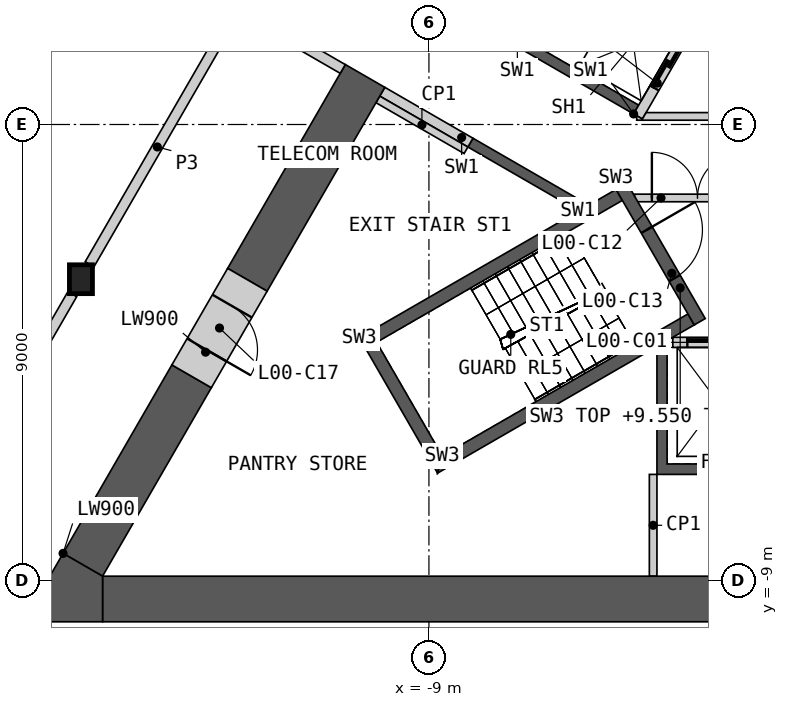
"""IFC4 building model, lengths in metres.
Left out: names, types, materials, properties, quantities, classifications, styles, units other than length and angle.
Written with IfcOpenShell. Run it as: python <this file> out.ifc"""

import sys

from ifc_helpers import new_model, si_unit, direction, frame, frame_2d, origin, origin_2d, place, context, subcontext, project, spatial, polyline, rectangle, i_section, outline, extrude, element, fill, save


model = new_model("IFC4")
c1 = context("Model", 3, precision=1e-05, world=origin(), true_north=direction((0.0, 1.0)))
c2 = subcontext(c1, "Body", "Model", "MODEL_VIEW")
j1 = project(units=[si_unit("LENGTHUNIT", "METRE"), si_unit("PLANEANGLEUNIT", "RADIAN")], contexts=[c1])
p1 = place(None, origin())
s1 = spatial("IfcSite", under=j1, at=p1, CompositionType="ELEMENT")
p2 = place(p1, origin())
s2 = spatial("IfcBuilding", under=s1, at=p2, CompositionType="ELEMENT")
p3 = place(p2, origin())
s3 = spatial("IfcBuildingStorey", under=s2, at=p3, CompositionType="ELEMENT", Elevation=0.0)
p4 = place(p3, frame((-15.868, -3.054, 0.0), z_axis=(0.0, 0.0, 1.0), x_axis=(1.0, 0.0, 0.0)))
e1 = element("IfcColumn", 1, at=p4, inside=s3, PredefinedType="COLUMN", context=c2, shape_type="SweptSolid", body=[
    extrude(i_section(OverallWidth=0.454, OverallDepth=0.57, WebThickness=0.078, FlangeThickness=0.125, at=origin_2d()), origin(), (0.0, 0.0, 1.0), 10.0),
])
p5 = place(p3, origin())
e2 = element("IfcWall", 2, at=p5, inside=s3, PredefinedType="SHEAR", context=c2, shape_type="SweptSolid", body=[
    extrude(outline(polyline([(4.5, -4.4), (4.5, -6.906), (-4.5, -6.906), (-4.5, -4.4), (-4.3, -4.4), (-4.3, -6.7), (-2.3, -6.7), (-2.3, -4.4), (-2.1, -4.4), (-2.1, -6.7), (-0.1, -6.7), (-0.1, -4.4), (0.1, -4.4), (0.1, -6.7), (2.1, -6.7), (2.1, -4.4), (2.3, -4.4), (2.3, -6.7), (4.3, -6.7), (4.3, -4.4), (4.5, -4.4)])), origin(), (0.0, 0.0, 1.0), 9.55),
])
p6 = place(p3, frame((-4.187, -4.3, 0.0), z_axis=(0.0, 0.0, 1.0), x_axis=(1.0, 0.0, 0.0)))
e3 = element("IfcWall", 3, at=p6, inside=s3, PredefinedType="SOLIDWALL", context=c2, shape_type="SweptSolid", body=[
    extrude(rectangle(XDim=8.373, YDim=0.2, at=frame_2d((4.187, 0.0))), origin(), (0.0, 0.0, 1.0), 9.55),
])
p7 = place(p6, frame((0.287, 0.0, 0.0)))
e4 = element("IfcOpeningElement", 4, at=p7, cuts=e3, PredefinedType="OPENING", context=c2, shape_type="SweptSolid", body=[
    extrude(rectangle(XDim=1.2, YDim=2.1, at=frame_2d((0.6, 1.05))), frame((0.0, 0.11, 0.0), z_axis=(0.0, -1.0, 0.0), x_axis=(1.0, 0.0, 0.0)), (0.0, 0.0, 1.0), 0.22),
])
p8 = place(p6, frame((2.387, 0.0, 0.0)))
e5 = element("IfcOpeningElement", 5, at=p8, cuts=e3, PredefinedType="OPENING", context=c2, shape_type="SweptSolid", body=[
    extrude(rectangle(XDim=1.4, YDim=2.1, at=frame_2d((0.7, 1.05))), frame((0.0, 0.11, 0.0), z_axis=(0.0, -1.0, 0.0), x_axis=(1.0, 0.0, 0.0)), (0.0, 0.0, 1.0), 0.22),
])
p9 = place(p6, frame((4.737, 0.0, 0.0)))
e6 = element("IfcOpeningElement", 6, at=p9, cuts=e3, PredefinedType="OPENING", context=c2, shape_type="SweptSolid", body=[
    extrude(rectangle(XDim=1.1, YDim=2.1, at=frame_2d((0.55, 1.05))), frame((0.0, 0.11, 0.0), z_axis=(0.0, -1.0, 0.0), x_axis=(1.0, 0.0, 0.0)), (0.0, 0.0, 1.0), 0.22),
])
p10 = place(p6, frame((6.887, 0.0, 0.0)))
e7 = element("IfcOpeningElement", 7, at=p10, cuts=e3, PredefinedType="OPENING", context=c2, shape_type="SweptSolid", body=[
    extrude(rectangle(XDim=1.2, YDim=2.1, at=frame_2d((0.6, 1.05))), frame((0.0, 0.11, 0.0), z_axis=(0.0, -1.0, 0.0), x_axis=(1.0, 0.0, 0.0)), (0.0, 0.0, 1.0), 0.22),
])
p11 = place(p3, origin())
e8 = element("IfcWall", 8, at=p11, inside=s3, PredefinedType="SHEAR", context=c2, shape_type="SweptSolid", body=[
    extrude(outline(polyline([(-6.061, -1.697), (-8.231, -0.444), (-8.131, -0.271), (-5.96, -1.524), (-6.061, -1.697)])), origin(), (0.0, 0.0, 1.0), 9.55),
])
p12 = place(p3, origin())
e9 = element("IfcWall", 9, at=p12, inside=s3, PredefinedType="SHEAR", context=c2, shape_type="SweptSolid", body=[
    extrude(outline(polyline([(-4.96, 0.208), (-7.131, 1.461), (-5.931, 3.54), (-3.76, 2.287), (-3.861, 2.113), (-5.852, 3.263), (-6.852, 1.531), (-4.861, 0.381), (-4.96, 0.208)])), origin(), (0.0, 0.0, 1.0), 9.55),
])
p13 = place(p3, frame((-1.631, 5.776, 0.0), z_axis=(0.0, 0.0, 1.0), x_axis=(-0.499992876559, -0.866029516466, 0.0)))
e10 = element("IfcWall", 10, at=p13, inside=s3, PredefinedType="SOLIDWALL", context=c2, shape_type="SweptSolid", body=[
    extrude(rectangle(XDim=6.486, YDim=0.2, at=frame_2d((3.243, 0.0))), origin(), (0.0, 0.0, 1.0), 9.55),
])
p14 = place(p13, frame((0.437, 0.0, 0.0)))
e11 = element("IfcOpeningElement", 11, at=p14, cuts=e10, PredefinedType="OPENING", context=c2, shape_type="SweptSolid", body=[
    extrude(rectangle(XDim=0.9, YDim=2.1, at=frame_2d((0.45, 1.05))), frame((0.0, 0.11, 0.0), z_axis=(0.0, -1.0, 0.0), x_axis=(1.0, 0.0, 0.0)), (0.0, 0.0, 1.0), 0.22),
])
p15 = place(p13, frame((2.637, 0.0, 0.0)))
e12 = element("IfcOpeningElement", 12, at=p15, cuts=e10, PredefinedType="OPENING", context=c2, shape_type="SweptSolid", body=[
    extrude(rectangle(XDim=0.9, YDim=2.1, at=frame_2d((0.45, 1.05))), frame((0.0, 0.11, 0.0), z_axis=(0.0, -1.0, 0.0), x_axis=(1.0, 0.0, 0.0)), (0.0, 0.0, 1.0), 0.22),
])
p16 = place(p13, frame((4.737, 0.0, 0.0)))
e13 = element("IfcOpeningElement", 13, at=p16, cuts=e10, PredefinedType="OPENING", context=c2, shape_type="SweptSolid", body=[
    extrude(rectangle(XDim=1.1, YDim=2.1, at=frame_2d((0.55, 1.05))), frame((0.0, 0.11, 0.0), z_axis=(0.0, -1.0, 0.0), x_axis=(1.0, 0.0, 0.0)), (0.0, 0.0, 1.0), 0.22),
])
p17 = place(p3, frame((-8.181, -0.357, 0.0), z_axis=(0.0, 0.0, 1.0), x_axis=(-0.866035824272, 0.499981950752, 0.0)))
e14 = element("IfcWall", 14, at=p17, inside=s3, PredefinedType="SHEAR", context=c2, shape_type="SweptSolid", body=[
    extrude(rectangle(XDim=2.009, YDim=0.2, at=frame_2d((1.004, 0.0))), origin(), (0.0, 0.0, 1.0), 9.55),
])
p18 = place(p3, frame((-4.941, -1.45, 0.0), z_axis=(0.0, 0.0, 1.0), x_axis=(1.0, 0.0, 0.0)))
e15 = element("IfcWall", 15, at=p18, inside=s3, PredefinedType="PARTITIONING", context=c2, shape_type="SweptSolid", body=[
    extrude(rectangle(XDim=9.882, YDim=0.15, at=frame_2d((4.941, 0.0))), origin(), (0.0, 0.0, 1.0), 9.55),
])
p19 = place(p18, frame((4.391, 0.0, 0.0)))
e16 = element("IfcOpeningElement", 16, at=p19, cuts=e15, PredefinedType="OPENING", context=c2, shape_type="SweptSolid", body=[
    extrude(rectangle(XDim=1.1, YDim=2.1, at=frame_2d((0.55, 1.05))), frame((0.0, 0.085, 0.0), z_axis=(0.0, -1.0, 0.0), x_axis=(1.0, 0.0, 0.0)), (0.0, 0.0, 1.0), 0.17),
])
p20 = place(p18, frame((0.341, 0.0, 0.0)))
e17 = element("IfcOpeningElement", 17, at=p20, cuts=e15, PredefinedType="OPENING", context=c2, shape_type="SweptSolid", body=[
    extrude(rectangle(XDim=1.8, YDim=2.1, at=frame_2d((0.9, 1.05))), frame((0.0, 0.085, 0.0), z_axis=(0.0, -1.0, 0.0), x_axis=(1.0, 0.0, 0.0)), (0.0, 0.0, 1.0), 0.17),
])
p21 = place(p3, origin())
e18 = element("IfcWall", 18, at=p21, inside=s3, PredefinedType="PARTITIONING", context=c2, shape_type="SweptSolid", body=[
    extrude(outline(polyline([(-2.575, 0.235), (-2.575, 0.085), (-4.9, 0.085), (-4.9, 0.173), (-4.787, 0.108), (-4.714, 0.235), (-2.575, 0.235)])), origin(), (0.0, 0.0, 1.0), 9.55),
])
p22 = place(p3, origin())
e19 = element("IfcWall", 19, at=p22, inside=s3, PredefinedType="SHEAR", context=c2, shape_type="SweptSolid", body=[
    extrude(outline(polyline([(-5.307, -1.281), (-10.374, -4.206), (-10.032, -4.298), (-5.182, -1.498), (-5.307, -1.281)])), origin(), (0.0, 0.0, 1.0), 9.55),
])
p23 = place(p3, origin())
e20 = element("IfcWall", 20, at=p23, inside=s3, PredefinedType="SHEAR", context=c2, shape_type="SweptSolid", body=[
    extrude(outline(polyline([(-10.374, -4.206), (-8.83, -6.881), (-8.738, -6.539), (-10.032, -4.298), (-10.374, -4.206)])), origin(), (0.0, 0.0, 1.0), 9.55),
])
p24 = place(p3, origin())
e21 = element("IfcWall", 21, at=p24, inside=s3, PredefinedType="SHEAR", context=c2, shape_type="SweptSolid", body=[
    extrude(outline(polyline([(-8.738, -6.539), (-8.83, -6.881), (-3.763, -3.956), (-3.888, -3.739), (-8.738, -6.539)])), origin(), (0.0, 0.0, 1.0), 9.55),
])
p25 = place(p3, frame((-5.199, -1.219, 0.0), z_axis=(0.0, 0.0, 1.0), x_axis=(0.499982516597, -0.866035497597, 0.0)))
e22 = element("IfcWall", 22, at=p25, inside=s3, PredefinedType="SHEAR", context=c2, shape_type="SweptSolid", body=[
    extrude(rectangle(XDim=3.088, YDim=0.25, at=frame_2d((1.544, 0.0))), origin(), (0.0, 0.0, 1.0), 9.55),
])
p26 = place(p25, frame((0.994, 0.0, 0.0)))
e23 = element("IfcOpeningElement", 23, at=p26, cuts=e22, PredefinedType="OPENING", context=c2, shape_type="SweptSolid", body=[
    extrude(rectangle(XDim=1.1, YDim=2.1, at=frame_2d((0.55, 1.05))), frame((0.0, 0.135, 0.0), z_axis=(0.0, -1.0, 0.0), x_axis=(1.0, 0.0, 0.0)), (0.0, 0.0, 1.0), 0.27),
])
p27 = place(p3, frame((-4.575, -6.906, 0.0), z_axis=(0.0, 0.0, 1.0), x_axis=(0.0, -1.0, 0.0)))
e24 = element("IfcWall", 24, at=p27, inside=s3, PredefinedType="PARTITIONING", context=c2, shape_type="SweptSolid", body=[
    extrude(rectangle(XDim=2.009, YDim=0.15, at=frame_2d((1.004, 0.0))), origin(), (0.0, 0.0, 1.0), 9.55),
])
p28 = place(p3, frame((-8.268, -0.509, 0.0), z_axis=(0.0, 0.0, 1.0), x_axis=(-0.866035824272, 0.499981950752, 0.0)))
e25 = element("IfcWall", 25, at=p28, inside=s3, PredefinedType="PARTITIONING", context=c2, shape_type="SweptSolid", body=[
    extrude(rectangle(XDim=2.009, YDim=0.15, at=frame_2d((1.004, 0.0))), origin(), (0.0, 0.0, 1.0), 9.55),
])
p29 = place(p3, frame((-15.441, -9.365, 0.0), z_axis=(0.0, 0.0, 1.0), x_axis=(1.0, 0.0, 0.0)))
e26 = element("IfcWall", 26, at=p29, inside=s3, PredefinedType="SHEAR", context=c2, shape_type="SweptSolid", body=[
    extrude(rectangle(XDim=14.341, YDim=0.9, at=frame_2d((7.17, 0.0))), origin(), (0.0, 0.0, 1.0), 9.55),
])
p30 = place(p3, frame((-10.26, 0.958, 0.0), z_axis=(0.0, 0.0, 1.0), x_axis=(-0.499993887256, -0.86602893295, 0.0)))
e27 = element("IfcWall", 27, at=p30, inside=s3, PredefinedType="SHEAR", context=c2, shape_type="SweptSolid", body=[
    extrude(rectangle(XDim=4.646, YDim=0.9, at=frame_2d((2.323, 0.0))), origin(), (0.0, 0.0, 1.0), 9.55),
])
p31 = place(p3, frame((-13.683, -4.97, 0.0), z_axis=(0.0, 0.0, 1.0), x_axis=(-0.499996331799, -0.866027521611, 0.0)))
e28 = element("IfcWall", 28, at=p31, inside=s3, PredefinedType="SHEAR", context=c2, shape_type="SweptSolid", body=[
    extrude(rectangle(XDim=4.295, YDim=0.9, at=frame_2d((2.148, 0.0))), origin(), (0.0, 0.0, 1.0), 9.55),
])
p32 = place(p3, origin())
e29 = element("IfcWall", 29, at=p32, inside=s3, PredefinedType="SHEAR", context=c2, shape_type="SweptSolid", body=[
    extrude(outline(polyline([(-16.221, -8.465), (-15.441, -8.915), (-15.441, -9.815), (-17.0, -9.815), (-16.221, -8.465)])), origin(), (0.0, 0.0, 1.0), 9.55),
])
p33 = place(p3, frame((-12.583, -3.065, 0.0), z_axis=(0.0, 0.0, 1.0), x_axis=(-0.50002983664, -0.866008176907, 0.0)))
e30 = element("IfcWall", 30, at=p33, inside=s3, PredefinedType="SHEAR", context=c2, shape_type="SweptSolid", body=[
    extrude(rectangle(XDim=2.2, YDim=0.9, at=frame_2d((1.1, 0.0))), origin(), (0.0, 0.0, 1.0), 9.55),
])
p34 = place(p33, frame((0.6, 0.0, 0.0)))
e31 = element("IfcOpeningElement", 31, at=p34, cuts=e30, PredefinedType="OPENING", context=c2, shape_type="SweptSolid", body=[
    extrude(rectangle(XDim=1.0, YDim=2.1, at=frame_2d((0.5, 1.05))), frame((0.0, 0.46, 0.0), z_axis=(0.0, -1.0, 0.0), x_axis=(1.0, 0.0, 0.0)), (0.0, 0.0, 1.0), 0.92),
])
p35 = place(p3, frame((-19.244, -8.902, 0.0), z_axis=(0.0, 0.0, 1.0), x_axis=(0.499988314375, 0.866032150378, 0.0)))
e32 = element("IfcWall", 32, at=p35, inside=s3, PredefinedType="PARTITIONING", context=c2, shape_type="SweptSolid", body=[
    extrude(rectangle(XDim=6.412, YDim=0.2, at=frame_2d((3.206, 0.0))), origin(), (0.0, 0.0, 1.0), 9.55),
])
p36 = place(p35, frame((2.256, 0.0, 0.0)))
e33 = element("IfcOpeningElement", 33, at=p36, cuts=e32, PredefinedType="OPENING", context=c2, shape_type="SweptSolid", body=[
    extrude(rectangle(XDim=2.0, YDim=2.1, at=frame_2d((1.0, 1.05))), frame((0.0, 0.11, 0.0), z_axis=(0.0, -1.0, 0.0), x_axis=(1.0, 0.0, 0.0)), (0.0, 0.0, 1.0), 0.22),
])
p37 = place(p3, frame((-15.698, -2.759, 0.0), z_axis=(0.0, 0.0, 1.0), x_axis=(0.500125484666, 0.865952943056, 0.0)))
e34 = element("IfcWall", 34, at=p37, inside=s3, PredefinedType="PARTITIONING", context=c2, shape_type="SweptSolid", body=[
    extrude(rectangle(XDim=5.348, YDim=0.2, at=frame_2d((2.674, 0.0))), origin(), (0.0, 0.0, 1.0), 9.55),
])
p38 = place(p3, frame((-12.865, 2.346, 0.0), z_axis=(0.0, 0.0, 1.0), x_axis=(0.866034292756, -0.499984603534, 0.0)))
e35 = element("IfcWall", 35, at=p38, inside=s3, PredefinedType="PARTITIONING", context=c2, shape_type="SweptSolid", body=[
    extrude(rectangle(XDim=2.499, YDim=0.2, at=frame_2d((1.25, 0.0))), origin(), (0.0, 0.0, 1.0), 9.55),
])
p39 = place(p7, origin())
e36 = element("IfcDoor", 36, at=p39, inside=s3, OperationType="SLIDING_TO_LEFT", PredefinedType="DOOR", context=c2, shape_type="SweptSolid", body=[
    extrude(rectangle(XDim=1.2, YDim=2.1, at=frame_2d((0.6, 1.05))), frame((0.0, 0.025, 0.0), z_axis=(0.0, -1.0, 0.0), x_axis=(1.0, 0.0, 0.0)), (0.0, 0.0, 1.0), 0.05),
])
fill(e4, e36)
p40 = place(p16, origin())
e37 = element("IfcDoor", 37, at=p40, inside=s3, OperationType="SLIDING_TO_LEFT", PredefinedType="DOOR", context=c2, shape_type="SweptSolid", body=[
    extrude(rectangle(XDim=1.1, YDim=2.1, at=frame_2d((0.55, 1.05))), frame((0.0, 0.025, 0.0), z_axis=(0.0, -1.0, 0.0), x_axis=(1.0, 0.0, 0.0)), (0.0, 0.0, 1.0), 0.05),
])
fill(e13, e37)
p41 = place(p20, origin())
e38 = element("IfcDoor", 38, at=p41, inside=s3, OperationType="DOUBLE_DOOR_SINGLE_SWING", PredefinedType="DOOR", context=c2, shape_type="SweptSolid", body=[
    extrude(rectangle(XDim=1.8, YDim=2.1, at=frame_2d((0.9, 1.05))), frame((0.0, 0.025, 0.0), z_axis=(0.0, -1.0, 0.0), x_axis=(1.0, 0.0, 0.0)), (0.0, 0.0, 1.0), 0.05),
])
fill(e17, e38)
p42 = place(p26, origin())
e39 = element("IfcDoor", 39, at=p42, inside=s3, OperationType="SINGLE_SWING_LEFT", PredefinedType="DOOR", context=c2, shape_type="SweptSolid", body=[
    extrude(rectangle(XDim=1.1, YDim=2.1, at=frame_2d((0.55, 1.05))), frame((0.0, 0.025, 0.0), z_axis=(0.0, -1.0, 0.0), x_axis=(1.0, 0.0, 0.0)), (0.0, 0.0, 1.0), 0.05),
])
fill(e23, e39)
p43 = place(p34, origin())
e40 = element("IfcDoor", 40, at=p43, inside=s3, OperationType="SINGLE_SWING_RIGHT", PredefinedType="DOOR", context=c2, shape_type="SweptSolid", body=[
    extrude(rectangle(XDim=1.0, YDim=2.1, at=frame_2d((0.5, 1.05))), frame((0.0, 0.205, 0.0), z_axis=(0.0, -1.0, 0.0), x_axis=(1.0, 0.0, 0.0)), (0.0, 0.0, 1.0), 0.05),
])
fill(e31, e40)
save(model, sys.argv[1])
